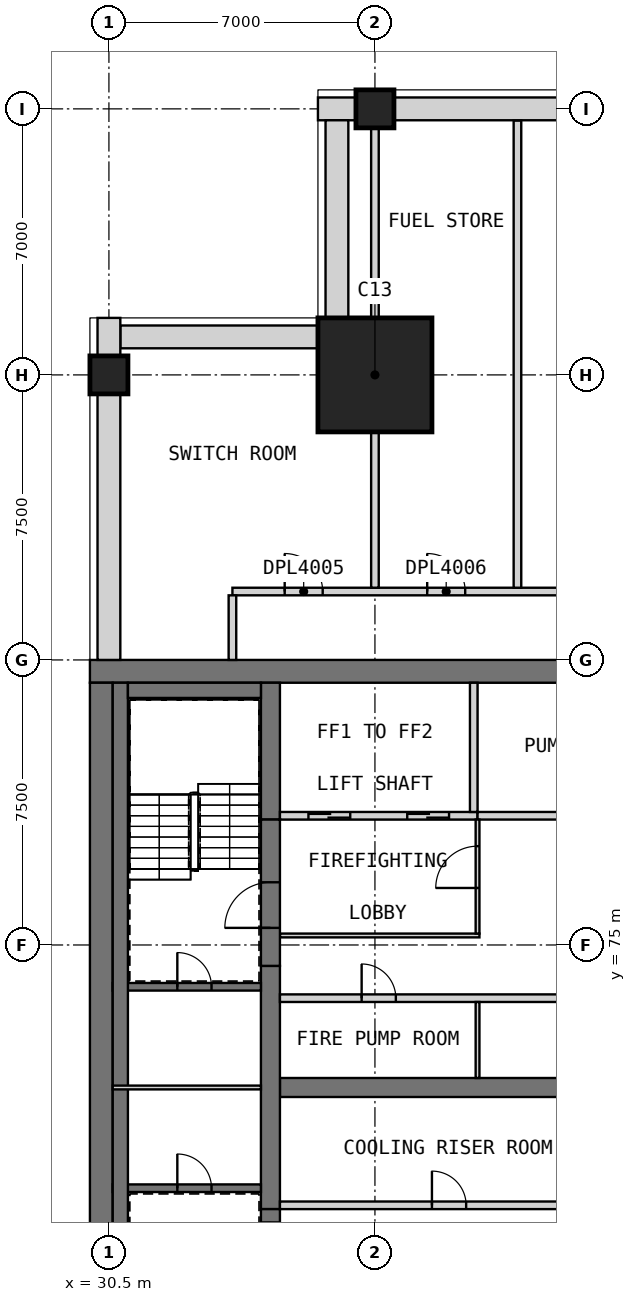
"""IFC4 building model, lengths in metres.
Left out: names, types, materials, properties, quantities, classifications, styles, units other than length and angle.
Written with IfcOpenShell. Run it as: python <this file> out.ifc"""

import sys

from ifc_helpers import new_model, si_unit, direction, frame, frame_2d, origin, origin_2d, place, context, subcontext, project, spatial, rectangle, extrude, element, fill, save


model = new_model("IFC4")
c1 = context("Model", 3, precision=1e-05, world=origin(), true_north=direction((0.0, 1.0)))
c2 = subcontext(c1, "Body", "Model", "MODEL_VIEW")
j1 = project(units=[si_unit("LENGTHUNIT", "METRE"), si_unit("PLANEANGLEUNIT", "RADIAN")], contexts=[c1])
p1 = place(None, origin())
s1 = spatial("IfcSite", under=j1, at=p1, CompositionType="ELEMENT")
p2 = place(p1, origin())
s2 = spatial("IfcBuilding", under=s1, at=p2, CompositionType="ELEMENT")
p3 = place(p2, frame((0.0, 0.0, 314.7)))
s3 = spatial("IfcBuildingStorey", under=s2, at=p3, CompositionType="ELEMENT", Elevation=314.7)
for number, where, z_axis, x_axis in (
    (1, (30.5, 90.0, 0.0), (0.0, 0.0, 1.0), (1.0, 0.0, 0.0)),
    (2, (37.5, 97.0, 0.0), (0.0, 0.0, 1.0), (1.0, 0.0, 0.0)),
):
    element("IfcColumn", number, at=place(p3, frame(where, z_axis=z_axis, x_axis=x_axis)), inside=s3, PredefinedType="COLUMN", context=c2, shape_type="SweptSolid", body=[
        extrude(rectangle(XDim=1.0, YDim=1.0, at=origin_2d()), origin(), (0.0, 0.0, 1.0), 5.5),
    ])
p4 = place(p3, frame((37.5, 90.0, 0.0), z_axis=(0.0, 0.0, 1.0), x_axis=(1.0, 0.0, 0.0)))
e3 = element("IfcColumn", 3, at=p4, inside=s3, PredefinedType="COLUMN", context=c2, shape_type="SweptSolid", body=[
    extrude(rectangle(XDim=3.0, YDim=3.0, at=origin_2d()), origin(), (0.0, 0.0, 1.0), 5.5),
])
p5 = place(p3, frame((30.0, 82.2, 0.0), z_axis=(0.0, 0.0, 1.0), x_axis=(1.0, 0.0, 0.0)))
e4 = element("IfcWall", 4, at=p5, inside=s3, PredefinedType="SHEAR", context=c2, shape_type="SweptSolid", body=[
    extrude(rectangle(XDim=30.0, YDim=0.6, at=frame_2d((15.0, 0.0))), origin(), (0.0, 0.0, 1.0), 5.5),
])
p6 = place(p3, frame((30.3, 60.6, 0.0), z_axis=(0.0, 0.0, 1.0), x_axis=(0.0, 1.0, 0.0)))
e5 = element("IfcWall", 5, at=p6, inside=s3, PredefinedType="SHEAR", context=c2, shape_type="SweptSolid", body=[
    extrude(rectangle(XDim=21.3, YDim=0.6, at=frame_2d((10.65, 0.0))), origin(), (0.0, 0.0, 1.0), 5.5),
])
p7 = place(p3, frame((35.0, 71.25, 0.0), z_axis=(0.0, 0.0, 1.0), x_axis=(1.0, 0.0, 0.0)))
e6 = element("IfcWall", 6, at=p7, inside=s3, PredefinedType="SHEAR", context=c2, shape_type="SweptSolid", body=[
    extrude(rectangle(XDim=15.6, YDim=0.5, at=frame_2d((7.8, 0.0))), origin(), (0.0, 0.0, 1.0), 5.5),
])
p8 = place(p3, frame((34.75, 68.05, 0.0), z_axis=(0.0, 0.0, 1.0), x_axis=(0.0, 1.0, 0.0)))
e7 = element("IfcWall", 7, at=p8, inside=s3, PredefinedType="SHEAR", context=c2, shape_type="SweptSolid", body=[
    extrude(rectangle(XDim=6.4, YDim=0.5, at=frame_2d((3.2, 0.0))), origin(), (0.0, 0.0, 1.0), 5.5),
])
p9 = place(p3, frame((34.75, 78.3, 0.0), z_axis=(0.0, 0.0, 1.0), x_axis=(0.0, 1.0, 0.0)))
e8 = element("IfcWall", 8, at=p9, inside=s3, PredefinedType="SHEAR", context=c2, shape_type="SweptSolid", body=[
    extrude(rectangle(XDim=3.6, YDim=0.5, at=frame_2d((1.8, 0.0))), origin(), (0.0, 0.0, 1.0), 5.5),
])
p10 = place(p2, frame((0.0, 0.0, 34.0)))
s4 = spatial("IfcBuildingStorey", under=s2, at=p10, CompositionType="ELEMENT", Elevation=34.0)
for number, where, z_axis, x_axis in (
    (9, (29.7, 70.8, 0.0), (0.0, 0.0, 1.0), (0.0, 1.0, 0.0)),
    (10, (29.7, 75.675, 0.0), (0.0, 0.0, 1.0), (0.0, 1.0, 0.0)),
    (11, (29.7, 80.55, 0.0), (0.0, 0.0, 1.0), (0.0, 1.0, 0.0)),
):
    element("IfcWall", number, at=place(p10, frame(where, z_axis=z_axis, x_axis=x_axis)), inside=s4, PredefinedType="SOLIDWALL", context=c2, shape_type="SweptSolid", body=[
        extrude(rectangle(XDim=0.9, YDim=0.6, at=frame_2d((0.45, 0.0))), origin(), (0.0, 0.0, 1.0), 286.2),
    ])
p11 = place(p3, frame((44.5, 97.0, 0.0), z_axis=(0.0, 0.0, 1.0), x_axis=(-1.0, 0.0, 0.0)))
e12 = element("IfcWall", 12, at=p11, inside=s3, PredefinedType="ELEMENTEDWALL", context=c2, shape_type="SweptSolid", body=[
    extrude(rectangle(XDim=6.5, YDim=0.6, at=frame_2d((3.25, 0.0))), origin(), (0.0, 0.0, 1.0), 5.1),
])
p12 = place(p3, frame((37.0, 97.0, 0.0), z_axis=(0.0, 0.0, 1.0), x_axis=(-1.0, 0.0, 0.0)))
e13 = element("IfcWall", 13, at=p12, inside=s3, PredefinedType="ELEMENTEDWALL", context=c2, shape_type="SweptSolid", body=[
    extrude(rectangle(XDim=1.0, YDim=0.6, at=frame_2d((0.5, 0.0))), origin(), (0.0, 0.0, 1.0), 5.1),
])
for number, where, z_axis, x_axis in (
    (14, (36.5, 96.7, 0.0), (0.0, 0.0, 1.0), (0.0, -1.0, 0.0)),
    (15, (36.0, 91.0, 0.0), (0.0, 0.0, 1.0), (-1.0, 0.0, 0.0)),
):
    element("IfcWall", number, at=place(p3, frame(where, z_axis=z_axis, x_axis=x_axis)), inside=s3, PredefinedType="ELEMENTEDWALL", context=c2, shape_type="SweptSolid", body=[
        extrude(rectangle(XDim=5.2, YDim=0.6, at=frame_2d((2.6, 0.0))), origin(), (0.0, 0.0, 1.0), 5.1),
    ])
p13 = place(p3, frame((30.5, 91.5, 0.0), z_axis=(0.0, 0.0, 1.0), x_axis=(0.0, -1.0, 0.0)))
e16 = element("IfcWall", 16, at=p13, inside=s3, PredefinedType="ELEMENTEDWALL", context=c2, shape_type="SweptSolid", body=[
    extrude(rectangle(XDim=1.0, YDim=0.6, at=frame_2d((0.5, 0.0))), origin(), (0.0, 0.0, 1.0), 5.1),
])
p14 = place(p3, frame((30.5, 89.5, 0.0), z_axis=(0.0, 0.0, 1.0), x_axis=(0.0, -1.0, 0.0)))
e17 = element("IfcWall", 17, at=p14, inside=s3, PredefinedType="ELEMENTEDWALL", context=c2, shape_type="SweptSolid", body=[
    extrude(rectangle(XDim=7.0, YDim=0.6, at=frame_2d((3.5, 0.0))), origin(), (0.0, 0.0, 1.0), 5.1),
])
p15 = place(p3, frame((35.0, 68.15, 0.0), z_axis=(0.0, 0.0, 1.0), x_axis=(1.0, 0.0, 0.0)))
e18 = element("IfcWall", 18, at=p15, inside=s3, PredefinedType="PARTITIONING", context=c2, shape_type="SweptSolid", body=[
    extrude(rectangle(XDim=15.6, YDim=0.2, at=frame_2d((7.8, 0.0))), origin(), (0.0, 0.0, 1.0), 5.09),
])
p16 = place(p15, frame((4.0, 0.0, 0.0)))
e19 = element("IfcOpeningElement", 19, at=p16, cuts=e18, PredefinedType="OPENING", context=c2, shape_type="SweptSolid", body=[
    extrude(rectangle(XDim=0.9, YDim=2.1, at=frame_2d((0.45, 1.05))), frame((0.0, 0.11, 0.0), z_axis=(0.0, -1.0, 0.0), x_axis=(1.0, 0.0, 0.0)), (0.0, 0.0, 1.0), 0.22),
])
p17 = place(p15, frame((11.8, 0.0, 0.0)))
e20 = element("IfcOpeningElement", 20, at=p17, cuts=e18, PredefinedType="OPENING", context=c2, shape_type="SweptSolid", body=[
    extrude(rectangle(XDim=0.9, YDim=2.1, at=frame_2d((0.45, 1.05))), frame((0.0, 0.11, 0.0), z_axis=(0.0, -1.0, 0.0), x_axis=(1.0, 0.0, 0.0)), (0.0, 0.0, 1.0), 0.22),
])
p18 = place(p3, frame((35.0, 73.6, 0.0), z_axis=(0.0, 0.0, 1.0), x_axis=(1.0, 0.0, 0.0)))
e21 = element("IfcWall", 21, at=p18, inside=s3, PredefinedType="PARTITIONING", context=c2, shape_type="SweptSolid", body=[
    extrude(rectangle(XDim=15.6, YDim=0.2, at=frame_2d((7.8, 0.0))), origin(), (0.0, 0.0, 1.0), 5.09),
])
p19 = place(p18, frame((2.15, 0.0, 0.0)))
e22 = element("IfcOpeningElement", 22, at=p19, cuts=e21, PredefinedType="OPENING", context=c2, shape_type="SweptSolid", body=[
    extrude(rectangle(XDim=0.9, YDim=2.1, at=frame_2d((0.45, 1.05))), frame((0.0, 0.11, 0.0), z_axis=(0.0, -1.0, 0.0), x_axis=(1.0, 0.0, 0.0)), (0.0, 0.0, 1.0), 0.22),
])
p20 = place(p18, frame((9.95, 0.0, 0.0)))
e23 = element("IfcOpeningElement", 23, at=p20, cuts=e21, PredefinedType="OPENING", context=c2, shape_type="SweptSolid", body=[
    extrude(rectangle(XDim=0.9, YDim=2.1, at=frame_2d((0.45, 1.05))), frame((0.0, 0.11, 0.0), z_axis=(0.0, -1.0, 0.0), x_axis=(1.0, 0.0, 0.0)), (0.0, 0.0, 1.0), 0.22),
])
p21 = place(p3, frame((40.2, 71.5, 0.0), z_axis=(0.0, 0.0, 1.0), x_axis=(0.0, 1.0, 0.0)))
e24 = element("IfcWall", 24, at=p21, inside=s3, PredefinedType="PARTITIONING", context=c2, shape_type="SweptSolid", body=[
    extrude(rectangle(XDim=2.0, YDim=0.1, at=frame_2d((1.0, 0.0))), origin(), (0.0, 0.0, 1.0), 5.09),
])
p22 = place(p3, frame((35.0, 78.4, 0.0), z_axis=(0.0, 0.0, 1.0), x_axis=(1.0, 0.0, 0.0)))
e25 = element("IfcWall", 25, at=p22, inside=s3, PredefinedType="SOLIDWALL", context=c2, shape_type="SweptSolid", body=[
    extrude(rectangle(XDim=5.2, YDim=0.2, at=frame_2d((2.6, 0.0))), origin(), (0.0, 0.0, 1.0), 5.5),
])
p23 = place(p22, frame((0.75, 0.0, 0.0)))
e26 = element("IfcOpeningElement", 26, at=p23, cuts=e25, PredefinedType="OPENING", context=c2, shape_type="SweptSolid", body=[
    extrude(rectangle(XDim=1.1, YDim=2.1, at=frame_2d((0.55, 1.05))), frame((0.0, 0.11, 0.0), z_axis=(0.0, -1.0, 0.0), x_axis=(1.0, 0.0, 0.0)), (0.0, 0.0, 1.0), 0.22),
])
p24 = place(p22, frame((3.35, 0.0, 0.0)))
e27 = element("IfcOpeningElement", 27, at=p24, cuts=e25, PredefinedType="OPENING", context=c2, shape_type="SweptSolid", body=[
    extrude(rectangle(XDim=1.1, YDim=2.1, at=frame_2d((0.55, 1.05))), frame((0.0, 0.11, 0.0), z_axis=(0.0, -1.0, 0.0), x_axis=(1.0, 0.0, 0.0)), (0.0, 0.0, 1.0), 0.22),
])
p25 = place(p3, frame((40.1, 78.5, 0.0), z_axis=(0.0, 0.0, 1.0), x_axis=(0.0, 1.0, 0.0)))
e28 = element("IfcWall", 28, at=p25, inside=s3, PredefinedType="SOLIDWALL", context=c2, shape_type="SweptSolid", body=[
    extrude(rectangle(XDim=3.4, YDim=0.2, at=frame_2d((1.7, 0.0))), origin(), (0.0, 0.0, 1.0), 5.5),
])
p26 = place(p3, frame((40.2, 78.4, 0.0), z_axis=(0.0, 0.0, 1.0), x_axis=(1.0, 0.0, 0.0)))
e29 = element("IfcWall", 29, at=p26, inside=s3, PredefinedType="PARTITIONING", context=c2, shape_type="SweptSolid", body=[
    extrude(rectangle(XDim=5.2, YDim=0.2, at=frame_2d((2.6, 0.0))), origin(), (0.0, 0.0, 1.0), 5.09),
])
p27 = place(p26, frame((2.15, 0.0, 0.0)))
e30 = element("IfcOpeningElement", 30, at=p27, cuts=e29, PredefinedType="OPENING", context=c2, shape_type="SweptSolid", body=[
    extrude(rectangle(XDim=0.9, YDim=2.1, at=frame_2d((0.45, 1.05))), frame((0.0, 0.11, 0.0), z_axis=(0.0, -1.0, 0.0), x_axis=(1.0, 0.0, 0.0)), (0.0, 0.0, 1.0), 0.22),
])
p28 = place(p3, frame((35.0, 75.25, 0.0), z_axis=(0.0, 0.0, 1.0), x_axis=(1.0, 0.0, 0.0)))
e31 = element("IfcWall", 31, at=p28, inside=s3, PredefinedType="PARTITIONING", context=c2, shape_type="SweptSolid", body=[
    extrude(rectangle(XDim=5.25, YDim=0.1, at=frame_2d((2.625, 0.0))), origin(), (0.0, 0.0, 1.0), 5.09),
])
p29 = place(p3, frame((40.2, 75.3, 0.0), z_axis=(0.0, 0.0, 1.0), x_axis=(0.0, 1.0, 0.0)))
e32 = element("IfcWall", 32, at=p29, inside=s3, PredefinedType="PARTITIONING", context=c2, shape_type="SweptSolid", body=[
    extrude(rectangle(XDim=3.0, YDim=0.1, at=frame_2d((1.5, 0.0))), origin(), (0.0, 0.0, 1.0), 5.09),
])
p30 = place(p29, frame((1.2, 0.0, 0.0)))
e33 = element("IfcOpeningElement", 33, at=p30, cuts=e32, PredefinedType="OPENING", context=c2, shape_type="SweptSolid", body=[
    extrude(rectangle(XDim=1.1, YDim=2.1, at=frame_2d((0.55, 1.05))), frame((0.0, 0.06, 0.0), z_axis=(0.0, -1.0, 0.0), x_axis=(1.0, 0.0, 0.0)), (0.0, 0.0, 1.0), 0.12),
])
p31 = place(p3, frame((34.75, 64.2, 0.0), z_axis=(0.0, 0.0, 1.0), x_axis=(0.0, 1.0, 0.0)))
e34 = element("IfcWall", 34, at=p31, inside=s3, PredefinedType="SOLIDWALL", context=c2, shape_type="SweptSolid", body=[
    extrude(rectangle(XDim=3.85, YDim=0.5, at=frame_2d((1.925, 0.0))), origin(), (0.0, 0.0, 1.0), 4.3),
])
p32 = place(p31, frame((2.3, 0.0, 0.0)))
e35 = element("IfcOpeningElement", 35, at=p32, cuts=e34, PredefinedType="OPENING", context=c2, shape_type="SweptSolid", body=[
    extrude(rectangle(XDim=1.2, YDim=2.1, at=frame_2d((0.6, 1.05))), frame((0.0, 0.26, 0.0), z_axis=(0.0, -1.0, 0.0), x_axis=(1.0, 0.0, 0.0)), (0.0, 0.0, 1.0), 0.52),
])
p33 = place(p3, frame((34.75, 74.45, 0.0), z_axis=(0.0, 0.0, 1.0), x_axis=(0.0, 1.0, 0.0)))
e36 = element("IfcWall", 36, at=p33, inside=s3, PredefinedType="SOLIDWALL", context=c2, shape_type="SweptSolid", body=[
    extrude(rectangle(XDim=3.85, YDim=0.5, at=frame_2d((1.925, 0.0))), origin(), (0.0, 0.0, 1.0), 4.3),
])
p34 = place(p33, frame((1.0, 0.0, 0.0)))
e37 = element("IfcOpeningElement", 37, at=p34, cuts=e36, PredefinedType="OPENING", context=c2, shape_type="SweptSolid", body=[
    extrude(rectangle(XDim=1.2, YDim=2.1, at=frame_2d((0.6, 1.05))), frame((0.0, 0.26, 0.0), z_axis=(0.0, -1.0, 0.0), x_axis=(1.0, 0.0, 0.0)), (0.0, 0.0, 1.0), 0.52),
])
p35 = place(p3, frame((30.6, 68.6, 0.0), z_axis=(0.0, 0.0, 1.0), x_axis=(1.0, 0.0, 0.0)))
e38 = element("IfcWall", 38, at=p35, inside=s3, PredefinedType="SOLIDWALL", context=c2, shape_type="SweptSolid", body=[
    extrude(rectangle(XDim=3.9, YDim=0.2, at=frame_2d((1.95, 0.0))), origin(), (0.0, 0.0, 1.0), 5.09),
])
p36 = place(p35, frame((1.7, 0.0, 0.0)))
e39 = element("IfcOpeningElement", 39, at=p36, cuts=e38, PredefinedType="OPENING", context=c2, shape_type="SweptSolid", body=[
    extrude(rectangle(XDim=0.9, YDim=2.1, at=frame_2d((0.45, 1.05))), frame((0.0, 0.11, 0.0), z_axis=(0.0, -1.0, 0.0), x_axis=(1.0, 0.0, 0.0)), (0.0, 0.0, 1.0), 0.22),
])
p37 = place(p3, frame((30.6, 73.9, 0.0), z_axis=(0.0, 0.0, 1.0), x_axis=(1.0, 0.0, 0.0)))
e40 = element("IfcWall", 40, at=p37, inside=s3, PredefinedType="SOLIDWALL", context=c2, shape_type="SweptSolid", body=[
    extrude(rectangle(XDim=3.9, YDim=0.2, at=frame_2d((1.95, 0.0))), origin(), (0.0, 0.0, 1.0), 5.09),
])
p38 = place(p37, frame((1.7, 0.0, 0.0)))
e41 = element("IfcOpeningElement", 41, at=p38, cuts=e40, PredefinedType="OPENING", context=c2, shape_type="SweptSolid", body=[
    extrude(rectangle(XDim=0.9, YDim=2.1, at=frame_2d((0.45, 1.05))), frame((0.0, 0.11, 0.0), z_axis=(0.0, -1.0, 0.0), x_axis=(1.0, 0.0, 0.0)), (0.0, 0.0, 1.0), 0.22),
])
p39 = place(p3, frame((30.8, 60.6, 0.0), z_axis=(0.0, 0.0, 1.0), x_axis=(0.0, 1.0, 0.0)))
e42 = element("IfcWall", 42, at=p39, inside=s3, PredefinedType="SOLIDWALL", context=c2, shape_type="SweptSolid", body=[
    extrude(rectangle(XDim=21.3, YDim=0.4, at=frame_2d((10.65, 0.0))), origin(), (0.0, 0.0, 1.0), 5.09),
])
p40 = place(p3, frame((31.0, 81.7, 0.0), z_axis=(0.0, 0.0, 1.0), x_axis=(1.0, 0.0, 0.0)))
e43 = element("IfcWall", 43, at=p40, inside=s3, PredefinedType="SOLIDWALL", context=c2, shape_type="SweptSolid", body=[
    extrude(rectangle(XDim=3.5, YDim=0.4, at=frame_2d((1.75, 0.0))), origin(), (0.0, 0.0, 1.0), 5.09),
])
p41 = place(p3, frame((30.6, 71.25, 0.0), z_axis=(0.0, 0.0, 1.0), x_axis=(1.0, 0.0, 0.0)))
e44 = element("IfcWall", 44, at=p41, inside=s3, PredefinedType="PARTITIONING", context=c2, shape_type="SweptSolid", body=[
    extrude(rectangle(XDim=3.9, YDim=0.1, at=frame_2d((1.95, 0.0))), origin(), (0.0, 0.0, 1.0), 5.09),
])
p42 = place(p3, frame((33.75, 84.3, 0.0), z_axis=(0.0, 0.0, 1.0), x_axis=(1.0, 0.0, 0.0)))
e45 = element("IfcWall", 45, at=p42, inside=s3, PredefinedType="PARTITIONING", context=c2, shape_type="SweptSolid", body=[
    extrude(rectangle(XDim=28.05, YDim=0.2, at=frame_2d((14.025, 0.0))), origin(), (0.0, 0.0, 1.0), 5.1),
])
p43 = place(p42, frame((1.375, 0.0, 0.0)))
e46 = element("IfcOpeningElement", 46, at=p43, cuts=e45, PredefinedType="OPENING", context=c2, shape_type="SweptSolid", body=[
    extrude(rectangle(XDim=1.0, YDim=2.1, at=frame_2d((0.5, 1.05))), frame((0.0, 0.11, 0.0), z_axis=(0.0, -1.0, 0.0), x_axis=(1.0, 0.0, 0.0)), (0.0, 0.0, 1.0), 0.22),
])
p44 = place(p42, frame((5.125, 0.0, 0.0)))
e47 = element("IfcOpeningElement", 47, at=p44, cuts=e45, PredefinedType="OPENING", context=c2, shape_type="SweptSolid", body=[
    extrude(rectangle(XDim=1.0, YDim=2.1, at=frame_2d((0.5, 1.05))), frame((0.0, 0.11, 0.0), z_axis=(0.0, -1.0, 0.0), x_axis=(1.0, 0.0, 0.0)), (0.0, 0.0, 1.0), 0.22),
])
p45 = place(p42, frame((16.375, 0.0, 0.0)))
e48 = element("IfcOpeningElement", 48, at=p45, cuts=e45, PredefinedType="OPENING", context=c2, shape_type="SweptSolid", body=[
    extrude(rectangle(XDim=1.0, YDim=2.1, at=frame_2d((0.5, 1.05))), frame((0.0, 0.11, 0.0), z_axis=(0.0, -1.0, 0.0), x_axis=(1.0, 0.0, 0.0)), (0.0, 0.0, 1.0), 0.22),
])
p46 = place(p42, frame((26.65, 0.0, 0.0)))
e49 = element("IfcOpeningElement", 49, at=p46, cuts=e45, PredefinedType="OPENING", context=c2, shape_type="SweptSolid", body=[
    extrude(rectangle(XDim=1.0, YDim=2.1, at=frame_2d((0.5, 1.05))), frame((0.0, 0.11, 0.0), z_axis=(0.0, -1.0, 0.0), x_axis=(1.0, 0.0, 0.0)), (0.0, 0.0, 1.0), 0.22),
])
p47 = place(p3, frame((33.75, 82.5, 0.0), z_axis=(0.0, 0.0, 1.0), x_axis=(0.0, 1.0, 0.0)))
e50 = element("IfcWall", 50, at=p47, inside=s3, PredefinedType="PARTITIONING", context=c2, shape_type="SweptSolid", body=[
    extrude(rectangle(XDim=1.7, YDim=0.2, at=frame_2d((0.85, 0.0))), origin(), (0.0, 0.0, 1.0), 5.1),
])
p48 = place(p3, frame((37.5, 84.4, 0.0), z_axis=(0.0, 0.0, 1.0), x_axis=(0.0, 1.0, 0.0)))
e51 = element("IfcWall", 51, at=p48, inside=s3, PredefinedType="PARTITIONING", context=c2, shape_type="SweptSolid", body=[
    extrude(rectangle(XDim=13.1, YDim=0.2, at=frame_2d((6.55, 0.0))), origin(), (0.0, 0.0, 1.0), 5.1),
])
p49 = place(p3, frame((41.25, 84.4, 0.0), z_axis=(0.0, 0.0, 1.0), x_axis=(0.0, 1.0, 0.0)))
e52 = element("IfcWall", 52, at=p49, inside=s3, PredefinedType="PARTITIONING", context=c2, shape_type="SweptSolid", body=[
    extrude(rectangle(XDim=12.29, YDim=0.2, at=frame_2d((6.145, 0.0))), origin(), (0.0, 0.0, 1.0), 5.1),
])
p50 = place(p16, origin())
e53 = element("IfcDoor", 53, at=p50, inside=s3, OperationType="SINGLE_SWING_LEFT", PredefinedType="DOOR", context=c2, shape_type="SweptSolid", body=[
    extrude(rectangle(XDim=0.9, YDim=2.1, at=frame_2d((0.45, 1.05))), frame((0.0, 0.025, 0.0), z_axis=(0.0, -1.0, 0.0), x_axis=(1.0, 0.0, 0.0)), (0.0, 0.0, 1.0), 0.05),
])
fill(e19, e53)
p51 = place(p19, origin())
e54 = element("IfcDoor", 54, at=p51, inside=s3, OperationType="SINGLE_SWING_LEFT", PredefinedType="DOOR", context=c2, shape_type="SweptSolid", body=[
    extrude(rectangle(XDim=0.9, YDim=2.1, at=frame_2d((0.45, 1.05))), frame((0.0, 0.025, 0.0), z_axis=(0.0, -1.0, 0.0), x_axis=(1.0, 0.0, 0.0)), (0.0, 0.0, 1.0), 0.05),
])
fill(e22, e54)
p52 = place(p23, origin())
e55 = element("IfcDoor", 55, at=p52, inside=s3, OperationType="DOUBLE_DOOR_SLIDING", PredefinedType="DOOR", context=c2, shape_type="SweptSolid", body=[
    extrude(rectangle(XDim=1.1, YDim=2.1, at=frame_2d((0.55, 1.05))), frame((0.0, 0.025, 0.0), z_axis=(0.0, -1.0, 0.0), x_axis=(1.0, 0.0, 0.0)), (0.0, 0.0, 1.0), 0.05),
])
fill(e26, e55)
p53 = place(p24, origin())
e56 = element("IfcDoor", 56, at=p53, inside=s3, OperationType="DOUBLE_DOOR_SLIDING", PredefinedType="DOOR", context=c2, shape_type="SweptSolid", body=[
    extrude(rectangle(XDim=1.1, YDim=2.1, at=frame_2d((0.55, 1.05))), frame((0.0, 0.025, 0.0), z_axis=(0.0, -1.0, 0.0), x_axis=(1.0, 0.0, 0.0)), (0.0, 0.0, 1.0), 0.05),
])
fill(e27, e56)
p54 = place(p30, origin())
e57 = element("IfcDoor", 57, at=p54, inside=s3, OperationType="SINGLE_SWING_LEFT", PredefinedType="DOOR", context=c2, shape_type="SweptSolid", body=[
    extrude(rectangle(XDim=1.1, YDim=2.1, at=frame_2d((0.55, 1.05))), frame((0.0, 0.025, 0.0), z_axis=(0.0, -1.0, 0.0), x_axis=(1.0, 0.0, 0.0)), (0.0, 0.0, 1.0), 0.05),
])
fill(e33, e57)
p55 = place(p32, origin())
e58 = element("IfcDoor", 58, at=p55, inside=s3, OperationType="SINGLE_SWING_LEFT", PredefinedType="DOOR", context=c2, shape_type="SweptSolid", body=[
    extrude(rectangle(XDim=1.2, YDim=2.1, at=frame_2d((0.6, 1.05))), frame((0.0, 0.025, 0.0), z_axis=(0.0, -1.0, 0.0), x_axis=(1.0, 0.0, 0.0)), (0.0, 0.0, 1.0), 0.05),
])
fill(e35, e58)
p56 = place(p34, origin())
e59 = element("IfcDoor", 59, at=p56, inside=s3, OperationType="SINGLE_SWING_RIGHT", PredefinedType="DOOR", context=c2, shape_type="SweptSolid", body=[
    extrude(rectangle(XDim=1.2, YDim=2.1, at=frame_2d((0.6, 1.05))), frame((0.0, 0.025, 0.0), z_axis=(0.0, -1.0, 0.0), x_axis=(1.0, 0.0, 0.0)), (0.0, 0.0, 1.0), 0.05),
])
fill(e37, e59)
p57 = place(p36, origin())
e60 = element("IfcDoor", 60, at=p57, inside=s3, OperationType="SINGLE_SWING_LEFT", PredefinedType="DOOR", context=c2, shape_type="SweptSolid", body=[
    extrude(rectangle(XDim=0.9, YDim=2.1, at=frame_2d((0.45, 1.05))), frame((0.0, 0.025, 0.0), z_axis=(0.0, -1.0, 0.0), x_axis=(1.0, 0.0, 0.0)), (0.0, 0.0, 1.0), 0.05),
])
fill(e39, e60)
p58 = place(p38, origin())
e61 = element("IfcDoor", 61, at=p58, inside=s3, OperationType="SINGLE_SWING_RIGHT", PredefinedType="DOOR", context=c2, shape_type="SweptSolid", body=[
    extrude(rectangle(XDim=0.9, YDim=2.1, at=frame_2d((0.45, 1.05))), frame((0.0, 0.025, 0.0), z_axis=(0.0, -1.0, 0.0), x_axis=(1.0, 0.0, 0.0)), (0.0, 0.0, 1.0), 0.05),
])
fill(e41, e61)
p59 = place(p43, origin())
e62 = element("IfcDoor", 62, at=p59, inside=s3, OperationType="SINGLE_SWING_LEFT", PredefinedType="DOOR", context=c2, shape_type="SweptSolid", body=[
    extrude(rectangle(XDim=1.0, YDim=2.1, at=frame_2d((0.5, 1.05))), frame((0.0, 0.025, 0.0), z_axis=(0.0, -1.0, 0.0), x_axis=(1.0, 0.0, 0.0)), (0.0, 0.0, 1.0), 0.05),
])
fill(e46, e62)
p60 = place(p44, origin())
e63 = element("IfcDoor", 63, at=p60, inside=s3, OperationType="SINGLE_SWING_LEFT", PredefinedType="DOOR", context=c2, shape_type="SweptSolid", body=[
    extrude(rectangle(XDim=1.0, YDim=2.1, at=frame_2d((0.5, 1.05))), frame((0.0, 0.025, 0.0), z_axis=(0.0, -1.0, 0.0), x_axis=(1.0, 0.0, 0.0)), (0.0, 0.0, 1.0), 0.05),
])
fill(e47, e63)
save(model, sys.argv[1])
